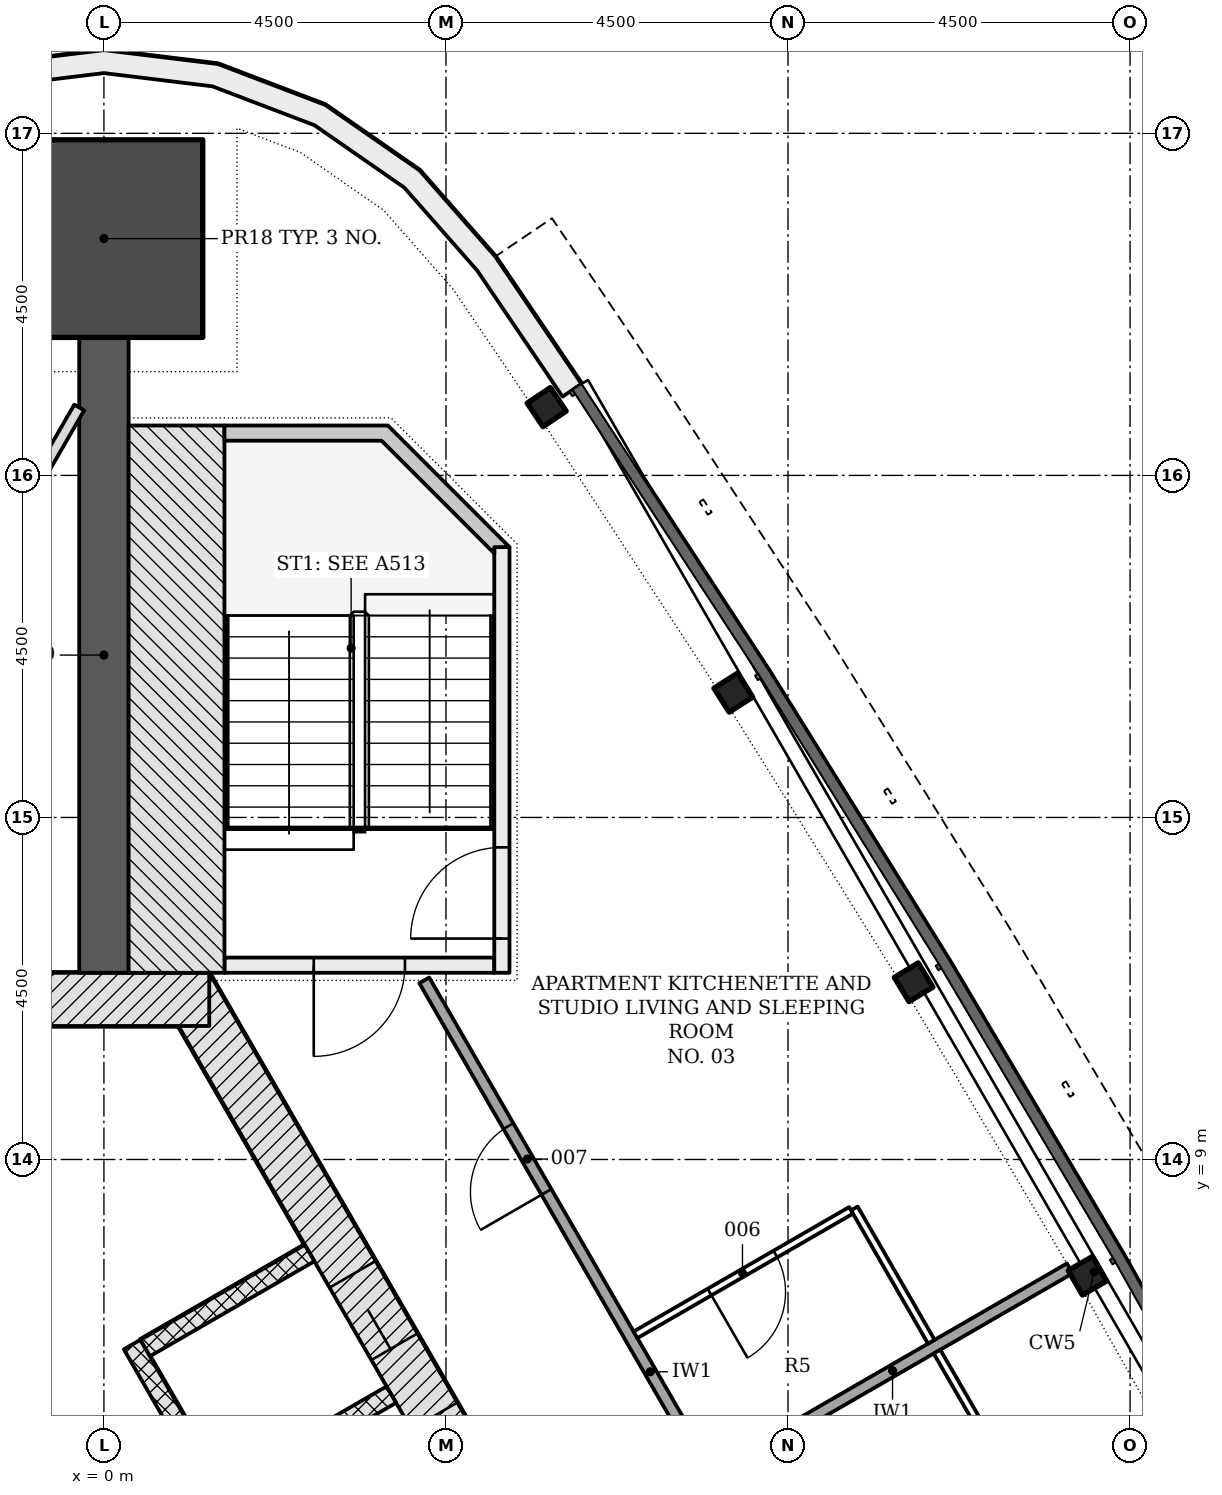
"""IFC4 building model, lengths in metres.
Left out: names, types, materials, properties, quantities, classifications, styles, units other than length and angle.
Written with IfcOpenShell. Run it as: python <this file> out.ifc"""

import sys

from ifc_helpers import new_model, si_unit, direction, frame, frame_2d, origin, origin_2d, place, context, subcontext, project, spatial, polyline, rectangle, i_section, outline, extrude, element, fill, save


model = new_model("IFC4")
c1 = context("Model", 3, precision=1e-05, world=origin(), true_north=direction((0.0, 1.0)))
c2 = subcontext(c1, "Body", "Model", "MODEL_VIEW")
j1 = project(units=[si_unit("LENGTHUNIT", "METRE"), si_unit("PLANEANGLEUNIT", "RADIAN")], contexts=[c1])
p1 = place(None, origin())
s1 = spatial("IfcSite", under=j1, at=p1, CompositionType="ELEMENT")
p2 = place(p1, origin())
s2 = spatial("IfcBuilding", under=s1, at=p2, CompositionType="ELEMENT")
p3 = place(p2, frame((0.0, 0.0, 222.0)))
s3 = spatial("IfcBuildingStorey", under=s2, at=p3, CompositionType="ELEMENT", Elevation=222.0)
p4 = place(p3, frame((10.311, -4.703, -0.2), z_axis=(0.0, 0.0, 1.0), x_axis=(-0.500001446645, 0.866024568562, 0.0)))
e1 = element("IfcWall", 1, at=p4, inside=s3, PredefinedType="SHEAR", context=c2, shape_type="SweptSolid", body=[
    extrude(rectangle(XDim=18.458, YDim=0.7, at=frame_2d((9.229, 0.0))), origin(), (0.0, 0.0, 1.0), 3.6),
])
p5 = place(p4, frame((4.379, 0.0, 0.2)))
e2 = element("IfcOpeningElement", 2, at=p5, cuts=e1, PredefinedType="OPENING", context=c2, shape_type="SweptSolid", body=[
    extrude(rectangle(XDim=1.1, YDim=2.1, at=frame_2d((0.55, 1.05))), frame((0.0, 0.36, 0.0), z_axis=(0.0, -1.0, 0.0), x_axis=(1.0, 0.0, 0.0)), (0.0, 0.0, 1.0), 0.72),
])
p6 = place(p4, frame((6.529, 0.0, 0.2)))
e3 = element("IfcOpeningElement", 3, at=p6, cuts=e1, PredefinedType="OPENING", context=c2, shape_type="SweptSolid", body=[
    extrude(rectangle(XDim=1.1, YDim=2.1, at=frame_2d((0.55, 1.05))), frame((0.0, 0.36, 0.0), z_axis=(0.0, -1.0, 0.0), x_axis=(1.0, 0.0, 0.0)), (0.0, 0.0, 1.0), 0.72),
])
p7 = place(p4, frame((8.679, 0.0, 0.2)))
e4 = element("IfcOpeningElement", 4, at=p7, cuts=e1, PredefinedType="OPENING", context=c2, shape_type="SweptSolid", body=[
    extrude(rectangle(XDim=1.1, YDim=2.1, at=frame_2d((0.55, 1.05))), frame((0.0, 0.36, 0.0), z_axis=(0.0, -1.0, 0.0), x_axis=(1.0, 0.0, 0.0)), (0.0, 0.0, 1.0), 0.72),
])
p8 = place(p4, frame((10.829, 0.0, 0.2)))
e5 = element("IfcOpeningElement", 5, at=p8, cuts=e1, PredefinedType="OPENING", context=c2, shape_type="SweptSolid", body=[
    extrude(rectangle(XDim=1.1, YDim=2.1, at=frame_2d((0.55, 1.05))), frame((0.0, 0.36, 0.0), z_axis=(0.0, -1.0, 0.0), x_axis=(1.0, 0.0, 0.0)), (0.0, 0.0, 1.0), 0.72),
])
p9 = place(p4, frame((12.979, 0.0, 0.2)))
e6 = element("IfcOpeningElement", 6, at=p9, cuts=e1, PredefinedType="OPENING", context=c2, shape_type="SweptSolid", body=[
    extrude(rectangle(XDim=1.1, YDim=2.1, at=frame_2d((0.55, 1.05))), frame((0.0, 0.36, 0.0), z_axis=(0.0, -1.0, 0.0), x_axis=(1.0, 0.0, 0.0)), (0.0, 0.0, 1.0), 0.72),
])
p10 = place(p3, frame((1.386, 11.106, -0.2), z_axis=(0.0, 0.0, 1.0), x_axis=(-1.0, 0.0, 0.0)))
e7 = element("IfcWall", 7, at=p10, inside=s3, PredefinedType="SHEAR", context=c2, shape_type="SweptSolid", body=[
    extrude(rectangle(XDim=2.771, YDim=0.7, at=frame_2d((1.386, 0.0))), origin(), (0.0, 0.0, 1.0), 3.6),
])
p11 = place(p3, frame((0.0, 11.456, -0.2), z_axis=(0.0, 0.0, 1.0), x_axis=(0.0, 1.0, 0.0)))
e8 = element("IfcWall", 8, at=p11, inside=s3, PredefinedType="SHEAR", context=c2, shape_type="SweptSolid", body=[
    extrude(rectangle(XDim=8.359, YDim=0.65, at=frame_2d((4.179, 0.0))), origin(), (0.0, 0.0, 1.0), 3.6),
])
p12 = place(p3, frame((0.0, 21.115, -0.2), z_axis=(0.0, 0.0, 1.0), x_axis=(0.0, 1.0, 0.0)))
e9 = element("IfcColumn", 9, at=p12, inside=s3, PredefinedType="COLUMN", context=c2, shape_type="SweptSolid", body=[
    extrude(rectangle(XDim=2.6, YDim=2.6, at=origin_2d()), origin(), (0.0, 0.0, 1.0), 3.6),
])
for number, where, z_axis, x_axis in (
    (10, (12.939, 7.47, -0.2), (0.0, 0.0, 1.0), (-0.5, 0.866, 0.0)),
    (11, (10.652, 11.332, -0.2), (0.0, 0.0, 1.0), (-0.519, 0.855, 0.0)),
    (12, (8.281, 15.142, -0.2), (0.0, 0.0, 1.0), (-0.538, 0.843, 0.0)),
    (13, (5.825, 18.898, -0.2), (0.0, 0.0, 1.0), (-0.556, 0.831, 0.0)),
):
    element("IfcColumn", number, at=place(p3, frame(where, z_axis=z_axis, x_axis=x_axis)), inside=s3, PredefinedType="COLUMN", context=c2, shape_type="SweptSolid", body=[
        extrude(i_section(OverallWidth=0.373, OverallDepth=0.368, WebThickness=0.015, FlangeThickness=0.024, FilletRadius=0.015, at=origin_2d()), origin(), (0.0, 0.0, 1.0), 3.6),
    ])
p13 = place(p3, origin())
e14 = element("IfcWall", 14, at=p13, inside=s3, PredefinedType="NOTDEFINED", context=c2, shape_type="SweptSolid", body=[
    extrude(outline(polyline([(6.282, 19.204), (5.149, 20.879), (4.151, 22.013), (2.911, 22.874), (1.499, 23.412), (0.0, 23.595), (-1.499, 23.412), (-2.911, 22.874), (-4.151, 22.013), (-5.149, 20.879), (-6.282, 19.204), (-6.034, 19.036), (-4.911, 20.695), (-3.95, 21.787), (-2.77, 22.607), (-1.427, 23.119), (0.0, 23.293), (1.427, 23.119), (2.77, 22.607), (3.95, 21.787), (4.911, 20.695), (6.034, 19.036), (6.282, 19.204)])), origin(), (0.0, 0.0, 1.0), 3.3),
])
for number, where, z_axis, x_axis in (
    (15, (3.781, 5.907, -0.2), (0.0, 0.0, 1.0), (-0.866, -0.5, 0.0)),
    (16, (2.706, 7.769, -0.2), (0.0, 0.0, 1.0), (-0.866, -0.5, 0.0)),
):
    element("IfcWall", number, at=place(p3, frame(where, z_axis=z_axis, x_axis=x_axis)), inside=s3, PredefinedType="PARTITIONING", context=c2, shape_type="SweptSolid", body=[
        extrude(rectangle(XDim=2.5, YDim=0.25, at=frame_2d((1.25, 0.0))), origin(), (0.0, 0.0, 1.0), 3.6),
    ])
p14 = place(p3, frame((5.87, -2.961, 0.0), z_axis=(0.0, 0.0, 1.0), x_axis=(-0.50000615651, 0.866021849293, 0.0)))
e17 = element("IfcWall", 17, at=p14, inside=s3, PredefinedType="PARTITIONING", context=c2, shape_type="SweptSolid", body=[
    extrude(rectangle(XDim=11.0, YDim=0.25, at=frame_2d((5.5, 0.0))), origin(), (0.0, 0.0, 1.0), 3.4),
])
p15 = place(p3, frame((5.135, 11.556, -0.2), z_axis=(0.0, 0.0, 1.0), x_axis=(-1.0, 0.0, 0.0)))
e18 = element("IfcWall", 18, at=p15, inside=s3, PredefinedType="SHEAR", context=c2, shape_type="SweptSolid", body=[
    extrude(rectangle(XDim=3.55, YDim=0.2, at=frame_2d((1.775, 0.0))), origin(), (0.0, 0.0, 1.0), 3.6),
])
p16 = place(p15, frame((1.175, 0.0, 0.2)))
e19 = element("IfcOpeningElement", 19, at=p16, cuts=e18, PredefinedType="OPENING", context=c2, shape_type="SweptSolid", body=[
    extrude(rectangle(XDim=1.2, YDim=2.1, at=frame_2d((0.6, 1.05))), frame((0.0, 0.11, 0.0), z_axis=(0.0, -1.0, 0.0), x_axis=(1.0, 0.0, 0.0)), (0.0, 0.0, 1.0), 0.22),
])
p17 = place(p3, frame((5.236, 11.456, -0.2), z_axis=(0.0, 0.0, 1.0), x_axis=(0.0, 1.0, 0.0)))
e20 = element("IfcWall", 20, at=p17, inside=s3, PredefinedType="SHEAR", context=c2, shape_type="SweptSolid", body=[
    extrude(rectangle(XDim=5.6, YDim=0.2, at=frame_2d((2.8, 0.0))), origin(), (0.0, 0.0, 1.0), 3.6),
])
p18 = place(p17, frame((0.45, 0.0, 0.2)))
e21 = element("IfcOpeningElement", 21, at=p18, cuts=e20, PredefinedType="OPENING", context=c2, shape_type="SweptSolid", body=[
    extrude(rectangle(XDim=1.2, YDim=2.1, at=frame_2d((0.6, 1.05))), frame((0.0, 0.11, 0.0), z_axis=(0.0, -1.0, 0.0), x_axis=(1.0, 0.0, 0.0)), (0.0, 0.0, 1.0), 0.22),
])
p19 = place(p3, frame((0.955, 11.456, -0.2), z_axis=(0.0, 0.0, 1.0), x_axis=(0.0, 1.0, 0.0)))
e22 = element("IfcWall", 22, at=p19, inside=s3, PredefinedType="SHEAR", context=c2, shape_type="SweptSolid", body=[
    extrude(rectangle(XDim=7.2, YDim=1.261, at=frame_2d((3.6, 0.0))), origin(), (0.0, 0.0, 1.0), 3.6),
])
p20 = place(p3, frame((0.0, 0.0, -0.2)))
e23 = element("IfcWall", 23, at=p20, inside=s3, PredefinedType="SHEAR", context=c2, shape_type="SweptSolid", body=[
    extrude(outline(polyline([(5.336, 17.056), (3.736, 18.656), (1.586, 18.656), (1.586, 18.456), (3.653, 18.456), (5.135, 16.974), (5.135, 17.056), (5.135, 17.056), (5.135, 17.056), (5.135, 17.056), (5.135, 17.056), (5.135, 17.056), (5.135, 17.056), (5.135, 17.056), (5.135, 17.056), (5.135, 17.056), (5.135, 17.056), (5.135, 17.056), (5.135, 17.056), (5.135, 17.056), (5.135, 17.056), (5.135, 17.056), (5.135, 17.056), (5.336, 17.056)])), origin(), (0.0, 0.0, 1.0), 3.6),
])
p21 = place(p3, frame((10.161, 1.058, 0.0), z_axis=(0.0, 0.0, 1.0), x_axis=(-0.500000866012, 0.866024903792, 0.0)))
e24 = element("IfcWall", 24, at=p21, inside=s3, PredefinedType="PARTITIONING", context=c2, shape_type="SweptSolid", body=[
    extrude(rectangle(XDim=11.892, YDim=0.15, at=frame_2d((5.946, 0.0))), origin(), (0.0, 0.0, 1.0), 2.852),
])
p22 = place(p21, frame((8.678, 0.0, 0.0)))
e25 = element("IfcOpeningElement", 25, at=p22, cuts=e24, PredefinedType="OPENING", context=c2, shape_type="SweptSolid", body=[
    extrude(rectangle(XDim=1.0, YDim=2.1, at=frame_2d((0.5, 1.05))), frame((0.0, 0.085, 0.0), z_axis=(0.0, -1.0, 0.0), x_axis=(1.0, 0.0, 0.0)), (0.0, 0.0, 1.0), 0.17),
])
p23 = place(p3, frame((10.96, 6.472, 0.0), z_axis=(0.0, 0.0, 1.0), x_axis=(0.499990325971, -0.866030989016, 0.0)))
e26 = element("IfcWall", 26, at=p23, inside=s3, PredefinedType="PARTITIONING", context=c2, shape_type="SweptSolid", body=[
    extrude(rectangle(XDim=2.025, YDim=0.1, at=frame_2d((1.012, 0.0))), origin(), (0.0, 0.0, 1.0), 2.852),
])
p24 = place(p3, frame((12.707, 7.567, 0.0), z_axis=(0.0, 0.0, 1.0), x_axis=(-0.866016468327, -0.500015476347, 0.0)))
e27 = element("IfcWall", 27, at=p24, inside=s3, PredefinedType="PARTITIONING", context=c2, shape_type="SweptSolid", body=[
    extrude(rectangle(XDim=5.385, YDim=0.15, at=frame_2d((2.692, 0.0))), origin(), (0.0, 0.0, 1.0), 3.4),
])
p25 = place(p3, frame((10.885, 6.602, 0.0), z_axis=(0.0, 0.0, 1.0), x_axis=(-0.499990325971, 0.866030989016, 0.0)))
e28 = element("IfcWall", 28, at=p25, inside=s3, PredefinedType="PARTITIONING", context=c2, shape_type="SweptSolid", body=[
    extrude(rectangle(XDim=2.025, YDim=0.1, at=frame_2d((1.012, 0.0))), origin(), (0.0, 0.0, 1.0), 3.4),
])
p26 = place(p3, frame((9.83, 8.331, 0.0), z_axis=(0.0, 0.0, 1.0), x_axis=(-0.865995643347, -0.500051543047, 0.0)))
e29 = element("IfcWall", 29, at=p26, inside=s3, PredefinedType="PARTITIONING", context=c2, shape_type="SweptSolid", body=[
    extrude(rectangle(XDim=3.275, YDim=0.1, at=frame_2d((1.638, 0.0))), origin(), (0.0, 0.0, 1.0), 3.4),
])
p27 = place(p26, frame((1.15, 0.0, 0.0)))
e30 = element("IfcOpeningElement", 30, at=p27, cuts=e29, PredefinedType="OPENING", context=c2, shape_type="SweptSolid", body=[
    extrude(rectangle(XDim=1.0, YDim=2.1, at=frame_2d((0.5, 1.05))), frame((0.0, 0.06, 0.0), z_axis=(0.0, -1.0, 0.0), x_axis=(1.0, 0.0, 0.0)), (0.0, 0.0, 1.0), 0.12),
])
p28 = place(p3, frame((-0.325, 18.894, 0.0), z_axis=(0.0, 0.0, 1.0), x_axis=(-0.500004255962, -0.86602294659, 0.0)))
e31 = element("IfcWall", 31, at=p28, inside=s3, PredefinedType="PARTITIONING", context=c2, shape_type="SweptSolid", body=[
    extrude(rectangle(XDim=7.649, YDim=0.15, at=frame_2d((3.825, 0.0))), origin(), (0.0, 0.0, 1.0), 2.852),
])
p29 = place(p8, origin())
e32 = element("IfcDoor", 32, at=p29, inside=s3, OperationType="DOUBLE_DOOR_SLIDING", PredefinedType="DOOR", context=c2, shape_type="SweptSolid", body=[
    extrude(rectangle(XDim=1.1, YDim=2.1, at=frame_2d((0.55, 1.05))), frame((0.0, 0.025, 0.0), z_axis=(0.0, -1.0, 0.0), x_axis=(1.0, 0.0, 0.0)), (0.0, 0.0, 1.0), 0.05),
])
fill(e5, e32)
p30 = place(p9, origin())
e33 = element("IfcDoor", 33, at=p30, inside=s3, OperationType="DOUBLE_DOOR_SLIDING", PredefinedType="DOOR", context=c2, shape_type="SweptSolid", body=[
    extrude(rectangle(XDim=1.1, YDim=2.1, at=frame_2d((0.55, 1.05))), frame((0.0, 0.025, 0.0), z_axis=(0.0, -1.0, 0.0), x_axis=(1.0, 0.0, 0.0)), (0.0, 0.0, 1.0), 0.05),
])
fill(e6, e33)
p31 = place(p16, origin())
e34 = element("IfcDoor", 34, at=p31, inside=s3, OperationType="SINGLE_SWING_RIGHT", PredefinedType="DOOR", context=c2, shape_type="SweptSolid", body=[
    extrude(rectangle(XDim=1.2, YDim=2.1, at=frame_2d((0.6, 1.05))), frame((0.0, 0.025, 0.0), z_axis=(0.0, -1.0, 0.0), x_axis=(1.0, 0.0, 0.0)), (0.0, 0.0, 1.0), 0.05),
])
fill(e19, e34)
p32 = place(p18, origin())
e35 = element("IfcDoor", 35, at=p32, inside=s3, OperationType="SINGLE_SWING_LEFT", PredefinedType="DOOR", context=c2, shape_type="SweptSolid", body=[
    extrude(rectangle(XDim=1.2, YDim=2.1, at=frame_2d((0.6, 1.05))), frame((0.0, 0.025, 0.0), z_axis=(0.0, -1.0, 0.0), x_axis=(1.0, 0.0, 0.0)), (0.0, 0.0, 1.0), 0.05),
])
fill(e21, e35)
p33 = place(p27, origin())
e36 = element("IfcDoor", 36, at=p33, inside=s3, OperationType="SINGLE_SWING_RIGHT", PredefinedType="DOOR", context=c2, shape_type="SweptSolid", body=[
    extrude(rectangle(XDim=1.0, YDim=2.1, at=frame_2d((0.5, 1.05))), frame((0.0, 0.025, 0.0), z_axis=(0.0, -1.0, 0.0), x_axis=(1.0, 0.0, 0.0)), (0.0, 0.0, 1.0), 0.05),
])
fill(e30, e36)
p34 = place(p22, origin())
e37 = element("IfcDoor", 37, at=p34, inside=s3, OperationType="SINGLE_SWING_LEFT", PredefinedType="DOOR", context=c2, shape_type="SweptSolid", body=[
    extrude(rectangle(XDim=1.0, YDim=2.1, at=frame_2d((0.5, 1.05))), frame((0.0, 0.025, 0.0), z_axis=(0.0, -1.0, 0.0), x_axis=(1.0, 0.0, 0.0)), (0.0, 0.0, 1.0), 0.05),
])
fill(e25, e37)
save(model, sys.argv[1])
